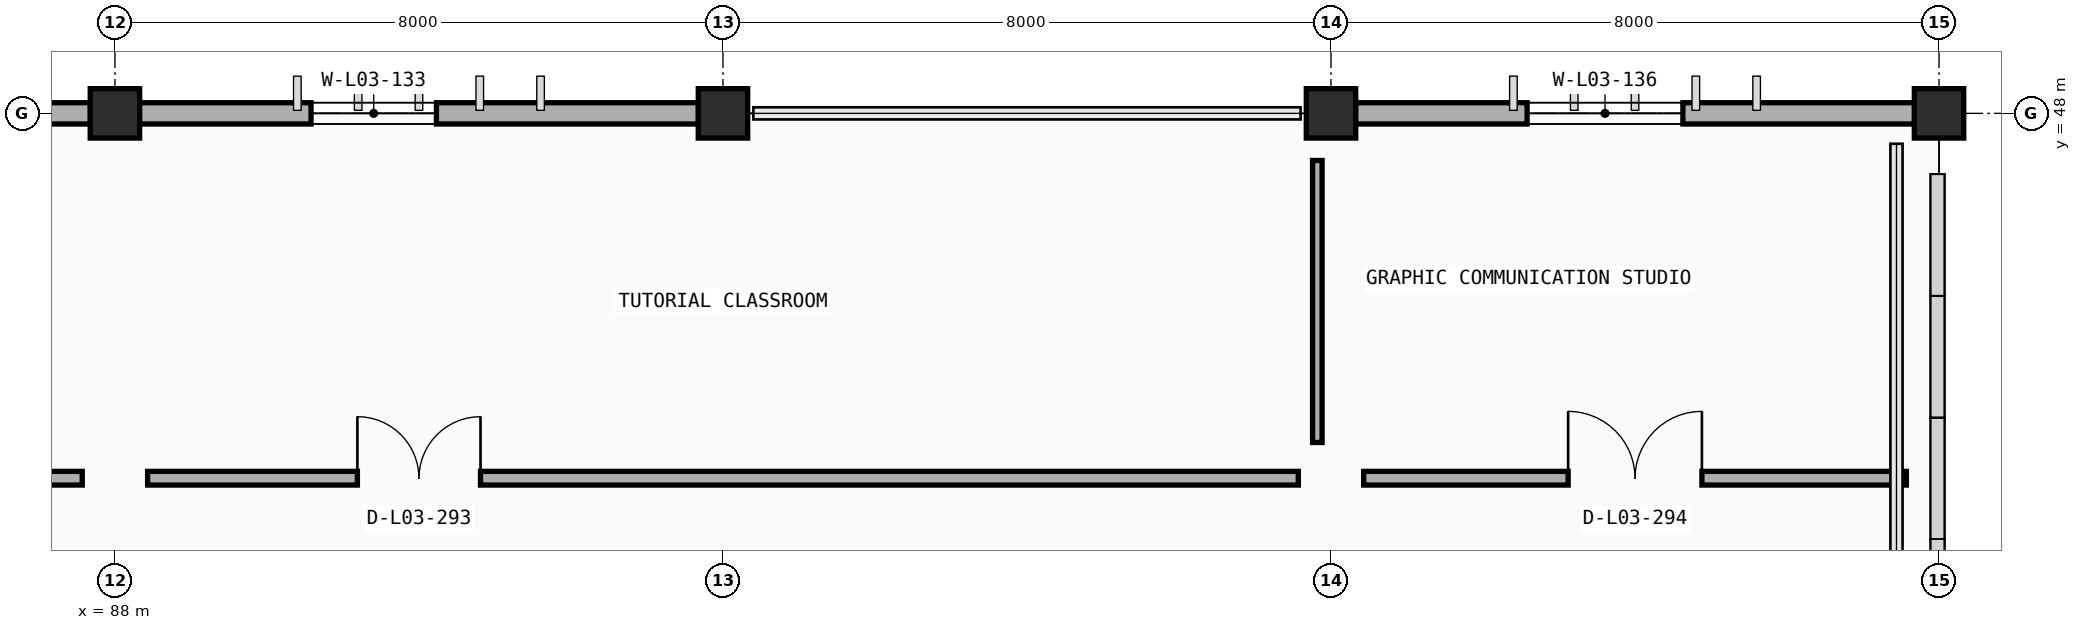
"""IFC4 building model, lengths in metres.
Left out: names, types, materials, properties, quantities, classifications, styles, units other than length and angle.
Written with IfcOpenShell. Run it as: python <this file> out.ifc"""

import sys

from ifc_helpers import new_model, si_unit, direction, frame, frame_2d, origin, origin_2d, place, context, subcontext, project, spatial, rectangle, extrude, element, fill, save


model = new_model("IFC4")
c1 = context("Model", 3, precision=1e-05, world=origin(), true_north=direction((0.0, 1.0)))
c2 = subcontext(c1, "Body", "Model", "MODEL_VIEW")
j1 = project(units=[si_unit("LENGTHUNIT", "METRE"), si_unit("PLANEANGLEUNIT", "RADIAN")], contexts=[c1])
p1 = place(None, origin())
s1 = spatial("IfcSite", under=j1, at=p1, CompositionType="ELEMENT")
p2 = place(p1, origin())
s2 = spatial("IfcBuilding", under=s1, at=p2, CompositionType="ELEMENT")
p3 = place(p2, frame((0.0, 0.0, 9.6)))
s3 = spatial("IfcBuildingStorey", under=s2, at=p3, CompositionType="ELEMENT", Elevation=9.6)
for number, where, z_axis, x_axis in (
    (1, (88.0, 48.0, 0.0), (0.0, 0.0, 1.0), (1.0, 0.0, 0.0)),
    (2, (96.0, 48.0, 0.0), (0.0, 0.0, 1.0), (1.0, 0.0, 0.0)),
    (3, (104.0, 48.0, 0.0), (0.0, 0.0, 1.0), (1.0, 0.0, 0.0)),
    (4, (112.0, 48.0, 0.0), (0.0, 0.0, 1.0), (1.0, 0.0, 0.0)),
):
    element("IfcColumn", number, at=place(p3, frame(where, z_axis=z_axis, x_axis=x_axis)), inside=s3, PredefinedType="COLUMN", context=c2, shape_type="SweptSolid", body=[
        extrude(rectangle(XDim=0.65, YDim=0.65, at=origin_2d()), origin(), (0.0, 0.0, 1.0), 4.2),
    ])
p4 = place(p3, frame((80.322, 48.0, 0.0), z_axis=(0.0, 0.0, 1.0), x_axis=(1.0, 0.0, 0.0)))
e5 = element("IfcWall", 5, at=p4, inside=s3, PredefinedType="STANDARD", context=c2, shape_type="SweptSolid", body=[
    extrude(rectangle(XDim=7.356, YDim=0.28, at=frame_2d((3.678, 0.0))), origin(), (0.0, 0.0, 1.0), 3.325),
])
p5 = place(p4, frame((2.258, 0.0, 0.9)))
e6 = element("IfcOpeningElement", 6, at=p5, cuts=e5, PredefinedType="OPENING", context=c2, shape_type="SweptSolid", body=[
    extrude(rectangle(XDim=2.25, YDim=1.55, at=frame_2d((1.125, 0.775))), frame((0.0, 0.15, 0.0), z_axis=(0.0, -1.0, 0.0), x_axis=(1.0, 0.0, 0.0)), (0.0, 0.0, 1.0), 0.3),
])
p6 = place(p3, frame((88.322, 48.0, 0.0), z_axis=(0.0, 0.0, 1.0), x_axis=(1.0, 0.0, 0.0)))
e7 = element("IfcWall", 7, at=p6, inside=s3, PredefinedType="STANDARD", context=c2, shape_type="SweptSolid", body=[
    extrude(rectangle(XDim=7.356, YDim=0.28, at=frame_2d((3.678, 0.0))), origin(), (0.0, 0.0, 1.0), 3.325),
])
p7 = place(p6, frame((2.258, 0.0, 0.9)))
e8 = element("IfcOpeningElement", 8, at=p7, cuts=e7, PredefinedType="OPENING", context=c2, shape_type="SweptSolid", body=[
    extrude(rectangle(XDim=1.65, YDim=1.55, at=frame_2d((0.825, 0.775))), frame((0.0, 0.15, 0.0), z_axis=(0.0, -1.0, 0.0), x_axis=(1.0, 0.0, 0.0)), (0.0, 0.0, 1.0), 0.3),
])
p8 = place(p3, frame((104.322, 48.0, 0.0), z_axis=(0.0, 0.0, 1.0), x_axis=(1.0, 0.0, 0.0)))
e9 = element("IfcWall", 9, at=p8, inside=s3, PredefinedType="STANDARD", context=c2, shape_type="SweptSolid", body=[
    extrude(rectangle(XDim=7.356, YDim=0.28, at=frame_2d((3.678, 0.0))), origin(), (0.0, 0.0, 1.0), 3.325),
])
p9 = place(p8, frame((2.258, 0.0, 0.9)))
e10 = element("IfcOpeningElement", 10, at=p9, cuts=e9, PredefinedType="OPENING", context=c2, shape_type="SweptSolid", body=[
    extrude(rectangle(XDim=2.05, YDim=1.55, at=frame_2d((1.025, 0.775))), frame((0.0, 0.15, 0.0), z_axis=(0.0, -1.0, 0.0), x_axis=(1.0, 0.0, 0.0)), (0.0, 0.0, 1.0), 0.3),
])
p10 = place(p3, frame((111.76, 47.78, 0.0), z_axis=(0.0, 0.0, 1.0), x_axis=(-1.0, 0.0, 0.0)))
e11 = element("IfcWall", 11, at=p10, inside=s3, PredefinedType="PARAPET", context=c2, shape_type="SweptSolid", body=[
    extrude(rectangle(XDim=0.32, YDim=0.2, at=frame_2d((0.16, 0.0))), origin(), (0.0, 0.0, 1.0), 3.35),
])
p11 = place(p3, frame((56.43, 43.2, 0.0), z_axis=(0.0, 0.0, 1.0), x_axis=(1.0, 0.0, 0.0)))
e12 = element("IfcWall", 12, at=p11, inside=s3, PredefinedType="PARTITIONING", context=c2, shape_type="SweptSolid", body=[
    extrude(rectangle(XDim=31.14, YDim=0.18, at=frame_2d((15.57, 0.0))), origin(), (0.0, 0.0, 1.0), 3.3),
])
p12 = place(p11, frame((2.995, 0.0, 0.0)))
e13 = element("IfcOpeningElement", 13, at=p12, cuts=e12, PredefinedType="OPENING", context=c2, shape_type="SweptSolid", body=[
    extrude(rectangle(XDim=1.15, YDim=2.15, at=frame_2d((0.575, 1.075))), frame((0.0, 0.1, 0.0), z_axis=(0.0, -1.0, 0.0), x_axis=(1.0, 0.0, 0.0)), (0.0, 0.0, 1.0), 0.2),
])
p13 = place(p3, frame((88.43, 43.2, 0.0), z_axis=(0.0, 0.0, 1.0), x_axis=(1.0, 0.0, 0.0)))
e14 = element("IfcWall", 14, at=p13, inside=s3, PredefinedType="PARTITIONING", context=c2, shape_type="SweptSolid", body=[
    extrude(rectangle(XDim=15.14, YDim=0.18, at=frame_2d((7.57, 0.0))), origin(), (0.0, 0.0, 1.0), 3.3),
])
p14 = place(p13, frame((2.76, 0.0, 0.0)))
e15 = element("IfcOpeningElement", 15, at=p14, cuts=e14, PredefinedType="OPENING", context=c2, shape_type="SweptSolid", body=[
    extrude(rectangle(XDim=1.62, YDim=2.2, at=frame_2d((0.81, 1.1))), frame((0.0, 0.1, 0.0), z_axis=(0.0, -1.0, 0.0), x_axis=(1.0, 0.0, 0.0)), (0.0, 0.0, 1.0), 0.2),
])
p15 = place(p3, frame((103.82, 43.67, 0.0), z_axis=(0.0, 0.0, 1.0), x_axis=(0.0, 1.0, 0.0)))
e16 = element("IfcWall", 16, at=p15, inside=s3, PredefinedType="PARTITIONING", context=c2, shape_type="SweptSolid", body=[
    extrude(rectangle(XDim=3.71, YDim=0.125, at=frame_2d((1.855, 0.0))), origin(), (0.0, 0.0, 1.0), 3.225),
])
p16 = place(p3, frame((104.43, 43.2, 0.0), z_axis=(0.0, 0.0, 1.0), x_axis=(1.0, 0.0, 0.0)))
e17 = element("IfcWall", 17, at=p16, inside=s3, PredefinedType="PARTITIONING", context=c2, shape_type="SweptSolid", body=[
    extrude(rectangle(XDim=7.14, YDim=0.18, at=frame_2d((3.57, 0.0))), origin(), (0.0, 0.0, 1.0), 3.3),
])
p17 = place(p16, frame((2.69, 0.0, 0.0)))
e18 = element("IfcOpeningElement", 18, at=p17, cuts=e17, PredefinedType="OPENING", context=c2, shape_type="SweptSolid", body=[
    extrude(rectangle(XDim=1.76, YDim=2.25, at=frame_2d((0.88, 1.125))), frame((0.0, 0.1, 0.0), z_axis=(0.0, -1.0, 0.0), x_axis=(1.0, 0.0, 0.0)), (0.0, 0.0, 1.0), 0.2),
])
p18 = place(p7, origin())
e19 = element("IfcWindow", 19, at=p18, inside=s3, PartitioningType="DOUBLE_PANEL_VERTICAL", PredefinedType="WINDOW", context=c2, shape_type="SweptSolid", body=[
    extrude(rectangle(XDim=1.65, YDim=1.55, at=frame_2d((0.825, 0.775))), frame((0.0, 0.03, 0.0), z_axis=(0.0, -1.0, 0.0), x_axis=(1.0, 0.0, 0.0)), (0.0, 0.0, 1.0), 0.06),
])
fill(e8, e19)
p19 = place(p9, origin())
e20 = element("IfcWindow", 20, at=p19, inside=s3, PartitioningType="DOUBLE_PANEL_VERTICAL", PredefinedType="WINDOW", context=c2, shape_type="SweptSolid", body=[
    extrude(rectangle(XDim=2.05, YDim=1.55, at=frame_2d((1.025, 0.775))), frame((0.0, 0.03, 0.0), z_axis=(0.0, -1.0, 0.0), x_axis=(1.0, 0.0, 0.0)), (0.0, 0.0, 1.0), 0.06),
])
fill(e10, e20)
p20 = place(p14, origin())
e21 = element("IfcDoor", 21, at=p20, inside=s3, OperationType="DOUBLE_DOOR_SINGLE_SWING", PredefinedType="DOOR", context=c2, shape_type="SweptSolid", body=[
    extrude(rectangle(XDim=1.62, YDim=2.2, at=frame_2d((0.81, 1.1))), frame((0.0, 0.025, 0.0), z_axis=(0.0, -1.0, 0.0), x_axis=(1.0, 0.0, 0.0)), (0.0, 0.0, 1.0), 0.05),
])
fill(e15, e21)
p21 = place(p17, origin())
e22 = element("IfcDoor", 22, at=p21, inside=s3, OperationType="DOUBLE_DOOR_SINGLE_SWING", PredefinedType="DOOR", context=c2, shape_type="SweptSolid", body=[
    extrude(rectangle(XDim=1.76, YDim=2.25, at=frame_2d((0.88, 1.125))), frame((0.0, 0.025, 0.0), z_axis=(0.0, -1.0, 0.0), x_axis=(1.0, 0.0, 0.0)), (0.0, 0.0, 1.0), 0.05),
])
fill(e18, e22)
save(model, sys.argv[1])
